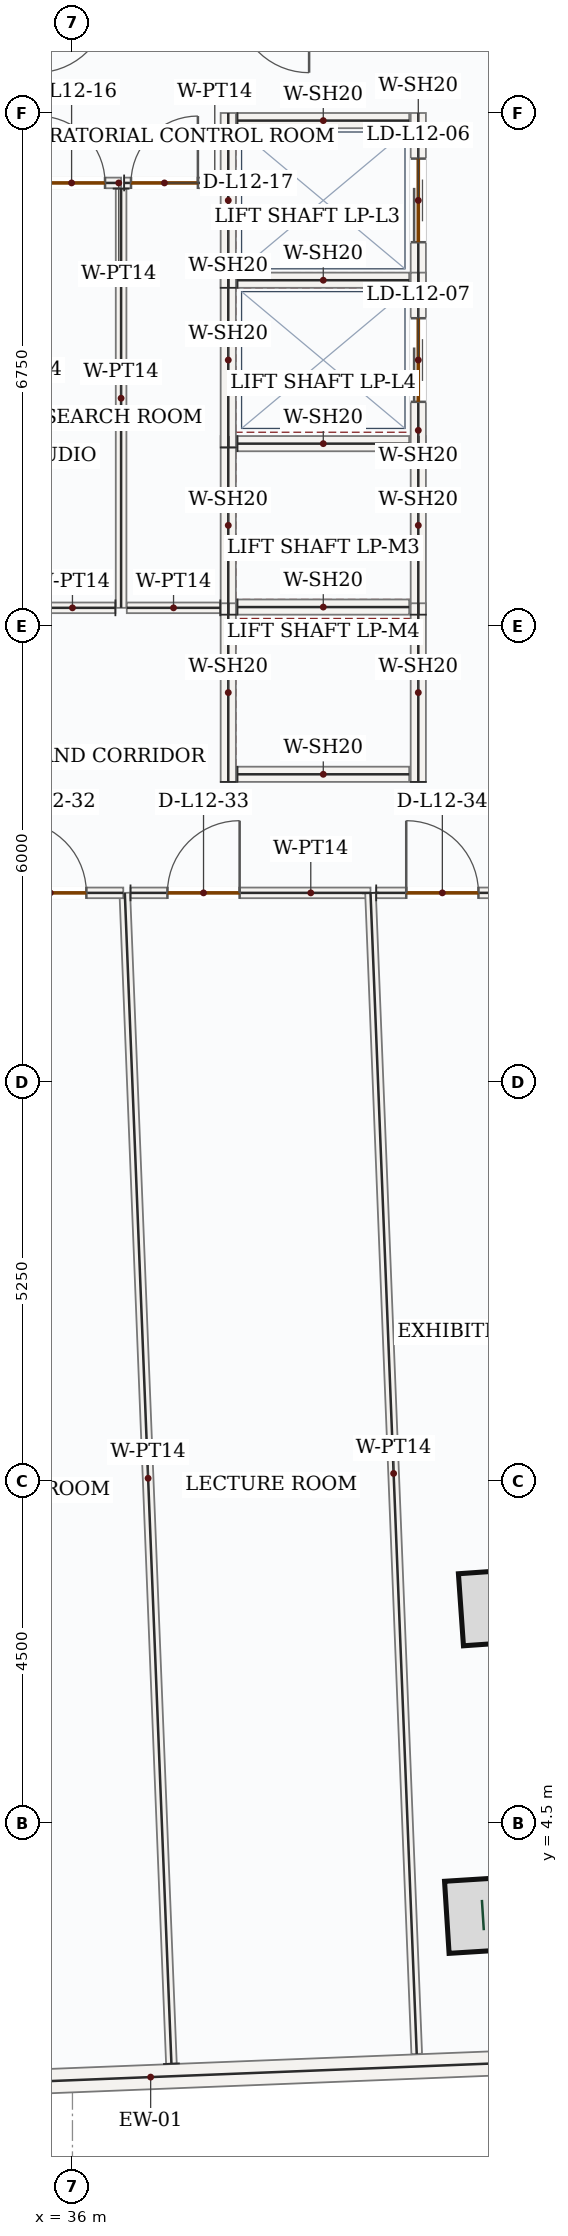
"""IFC4 building model, lengths in metres.
Left out: names, types, materials, properties, quantities, classifications, styles, units other than length and angle.
Written with IfcOpenShell. Run it as: python <this file> out.ifc"""

import sys

from ifc_helpers import new_model, si_unit, direction, frame, frame_2d, origin, origin_2d, place, context, subcontext, project, spatial, rectangle, hollow_rectangle, extrude, source, transform, mapped, element, fill, save


model = new_model("IFC4")
c1 = context("Model", 3, precision=1e-05, world=origin(), true_north=direction((0.0, 1.0)))
c2 = subcontext(c1, "Body", "Model", "MODEL_VIEW")
j1 = project(units=[si_unit("LENGTHUNIT", "METRE"), si_unit("PLANEANGLEUNIT", "RADIAN")], contexts=[c1])
p1 = place(None, origin())
s1 = spatial("IfcSite", under=j1, at=p1, CompositionType="ELEMENT")
p2 = place(p1, origin())
s2 = spatial("IfcBuilding", under=s1, at=p2, CompositionType="ELEMENT")
p3 = place(p2, frame((0.0, 0.0, 58.5)))
s3 = spatial("IfcBuildingStorey", under=s2, at=p3, CompositionType="ELEMENT", Elevation=58.5)
m1 = source(origin(), c2, "Body", "SweptSolid", [
    extrude(hollow_rectangle(XDim=0.95, YDim=0.95, WallThickness=0.05, at=origin_2d()), origin(), (0.0, 0.0, 1.0), 4.2),
])
for number, where, z_axis, x_axis in (
    (1, (41.585, 7.342, 0.0), (0.0, 0.0, 1.0), (-0.07, 0.998, 0.0)),
    (2, (41.399, 3.292, 0.0), (0.0, 0.0, 1.0), (-0.063, 0.998, 0.0)),
):
    element("IfcColumn", number, at=place(p3, frame(where, z_axis=z_axis, x_axis=x_axis)), inside=s3, PredefinedType="COLUMN", context=c2, shape_type="MappedRepresentation", body=[
        mapped(m1, transform((0.0, 0.0, 0.0), x_axis=(1.0, 0.0, 0.0), y_axis=(0.0, 1.0, 0.0), z_axis=(0.0, 0.0, 1.0), scale=1.0)),
    ])
m2 = source(origin(), c2, "Body", "SweptSolid", [
    extrude(rectangle(XDim=9.92, YDim=0.32, at=frame_2d((4.96, 0.0))), origin(), (0.0, 0.0, 1.0), 3.95),
])
p4 = place(p3, frame((41.985, 1.358, 0.0), z_axis=(0.0, 0.0, 1.0), x_axis=(-0.999207823998, -0.039796035749, 0.0)))
e3 = element("IfcWall", 3, at=p4, inside=s3, PredefinedType="SOLIDWALL", context=c2, shape_type="MappedRepresentation", body=[
    mapped(m2, transform((0.0, 0.0, 0.0), x_axis=(1.0, 0.0, 0.0), y_axis=(0.0, 1.0, 0.0), z_axis=(0.0, 0.0, 1.0), scale=1.0)),
])
m3 = source(origin(), c2, "Body", "SweptSolid", [
    extrude(rectangle(XDim=2.35, YDim=0.2, at=frame_2d((1.175, 0.0))), origin(), (0.0, 0.0, 1.0), 3.95),
])
for number, where, z_axis, x_axis in (
    (4, (38.05, 20.4, 0.0), (0.0, 0.0, 1.0), (0.0, 1.0, 0.0)),
    (5, (40.55, 20.4, 0.0), (0.0, 0.0, 1.0), (0.0, 1.0, 0.0)),
):
    element("IfcWall", number, at=place(p3, frame(where, z_axis=z_axis, x_axis=x_axis)), inside=s3, PredefinedType="SOLIDWALL", context=c2, shape_type="MappedRepresentation", body=[
        mapped(m3, transform((0.0, 0.0, 0.0), x_axis=(1.0, 0.0, 0.0), y_axis=(0.0, 1.0, 0.0), z_axis=(0.0, 0.0, 1.0), scale=1.0)),
    ])
m4 = source(origin(), c2, "Body", "SweptSolid", [
    extrude(rectangle(XDim=2.26, YDim=0.2, at=frame_2d((1.13, 0.0))), origin(), (0.0, 0.0, 1.0), 3.95),
])
for number, where, z_axis, x_axis in (
    (6, (38.17, 20.5, 0.0), (0.0, 0.0, 1.0), (1.0, 0.0, 0.0)),
    (7, (38.17, 22.65, 0.0), (0.0, 0.0, 1.0), (1.0, 0.0, 0.0)),
):
    element("IfcWall", number, at=place(p3, frame(where, z_axis=z_axis, x_axis=x_axis)), inside=s3, PredefinedType="SOLIDWALL", context=c2, shape_type="MappedRepresentation", body=[
        mapped(m4, transform((0.0, 0.0, 0.0), x_axis=(1.0, 0.0, 0.0), y_axis=(0.0, 1.0, 0.0), z_axis=(0.0, 0.0, 1.0), scale=1.0)),
    ])
for number, where, z_axis, x_axis in (
    (8, (38.05, 18.2, 0.0), (0.0, 0.0, 1.0), (0.0, 1.0, 0.0)),
    (9, (40.55, 18.2, 0.0), (0.0, 0.0, 1.0), (0.0, 1.0, 0.0)),
):
    element("IfcWall", number, at=place(p3, frame(where, z_axis=z_axis, x_axis=x_axis)), inside=s3, PredefinedType="SOLIDWALL", context=c2, shape_type="MappedRepresentation", body=[
        mapped(m3, transform((0.0, 0.0, 0.0), x_axis=(1.0, 0.0, 0.0), y_axis=(0.0, 1.0, 0.0), z_axis=(0.0, 0.0, 1.0), scale=1.0)),
    ])
p5 = place(p3, frame((38.17, 18.3, 0.0), z_axis=(0.0, 0.0, 1.0), x_axis=(1.0, 0.0, 0.0)))
e10 = element("IfcWall", 10, at=p5, inside=s3, PredefinedType="SOLIDWALL", context=c2, shape_type="MappedRepresentation", body=[
    mapped(m4, transform((0.0, 0.0, 0.0), x_axis=(1.0, 0.0, 0.0), y_axis=(0.0, 1.0, 0.0), z_axis=(0.0, 0.0, 1.0), scale=1.0)),
])
m5 = source(origin(), c2, "Body", "SweptSolid", [
    extrude(rectangle(XDim=2.3, YDim=0.2, at=frame_2d((1.15, 0.0))), origin(), (0.0, 0.0, 1.0), 3.95),
])
p6 = place(p3, frame((38.05, 24.7, 0.0), z_axis=(0.0, 0.0, 1.0), x_axis=(0.0, 1.0, 0.0)))
e11 = element("IfcWall", 11, at=p6, inside=s3, PredefinedType="SOLIDWALL", context=c2, shape_type="MappedRepresentation", body=[
    mapped(m5, transform((0.0, 0.0, 0.0), x_axis=(1.0, 0.0, 0.0), y_axis=(0.0, 1.0, 0.0), z_axis=(0.0, 0.0, 1.0), scale=1.0)),
])
p7 = place(p3, frame((40.55, 24.7, 0.0), z_axis=(0.0, 0.0, 1.0), x_axis=(0.0, 1.0, 0.0)))
e12 = element("IfcWall", 12, at=p7, inside=s3, PredefinedType="SOLIDWALL", context=c2, shape_type="SweptSolid", body=[
    extrude(rectangle(XDim=2.3, YDim=0.2, at=frame_2d((1.15, 0.0))), origin(), (0.0, 0.0, 1.0), 3.95),
])
p8 = place(p7, frame((0.6, 0.0, 0.0)))
e13 = element("IfcOpeningElement", 13, at=p8, cuts=e12, PredefinedType="OPENING", context=c2, shape_type="SweptSolid", body=[
    extrude(rectangle(XDim=1.1, YDim=2.15, at=frame_2d((0.55, 1.075))), frame((0.0, 0.11, 0.0), z_axis=(0.0, -1.0, 0.0), x_axis=(1.0, 0.0, 0.0)), (0.0, 0.0, 1.0), 0.22),
])
for number, where, z_axis, x_axis in (
    (14, (38.17, 24.8, 0.0), (0.0, 0.0, 1.0), (1.0, 0.0, 0.0)),
    (15, (38.17, 26.9, 0.0), (0.0, 0.0, 1.0), (1.0, 0.0, 0.0)),
):
    element("IfcWall", number, at=place(p3, frame(where, z_axis=z_axis, x_axis=x_axis)), inside=s3, PredefinedType="SOLIDWALL", context=c2, shape_type="MappedRepresentation", body=[
        mapped(m4, transform((0.0, 0.0, 0.0), x_axis=(1.0, 0.0, 0.0), y_axis=(0.0, 1.0, 0.0), z_axis=(0.0, 0.0, 1.0), scale=1.0)),
    ])
m6 = source(origin(), c2, "Body", "SweptSolid", [
    extrude(rectangle(XDim=2.3, YDim=0.2, at=frame_2d((1.15, 0.0))), origin(), (0.0, 0.0, 1.0), 3.95),
])
p9 = place(p3, frame((38.05, 22.6, 0.0), z_axis=(0.0, 0.0, 1.0), x_axis=(0.0, 1.0, 0.0)))
e16 = element("IfcWall", 16, at=p9, inside=s3, PredefinedType="SOLIDWALL", context=c2, shape_type="MappedRepresentation", body=[
    mapped(m6, transform((0.0, 0.0, 0.0), x_axis=(1.0, 0.0, 0.0), y_axis=(0.0, 1.0, 0.0), z_axis=(0.0, 0.0, 1.0), scale=1.0)),
])
p10 = place(p3, frame((40.55, 22.6, 0.0), z_axis=(0.0, 0.0, 1.0), x_axis=(0.0, 1.0, 0.0)))
e17 = element("IfcWall", 17, at=p10, inside=s3, PredefinedType="SOLIDWALL", context=c2, shape_type="SweptSolid", body=[
    extrude(rectangle(XDim=2.3, YDim=0.2, at=frame_2d((1.15, 0.0))), origin(), (0.0, 0.0, 1.0), 3.95),
])
p11 = place(p10, frame((0.6, 0.0, 0.0)))
e18 = element("IfcOpeningElement", 18, at=p11, cuts=e17, PredefinedType="OPENING", context=c2, shape_type="SweptSolid", body=[
    extrude(rectangle(XDim=1.1, YDim=2.15, at=frame_2d((0.55, 1.075))), frame((0.0, 0.11, 0.0), z_axis=(0.0, -1.0, 0.0), x_axis=(1.0, 0.0, 0.0)), (0.0, 0.0, 1.0), 0.22),
])
p12 = place(p3, frame((35.435, 26.08, 0.0), z_axis=(0.0, 0.0, 1.0), x_axis=(1.0, 0.0, 0.0)))
e19 = element("IfcWall", 19, at=p12, inside=s3, PredefinedType="PARTITIONING", context=c2, shape_type="SweptSolid", body=[
    extrude(rectangle(XDim=1.205, YDim=0.14, at=frame_2d((0.603, 0.0))), origin(), (0.0, 0.0, 1.0), 3.95),
])
p13 = place(p12, frame((0.114, 0.0, 0.0)))
e20 = element("IfcOpeningElement", 20, at=p13, cuts=e19, PredefinedType="OPENING", context=c2, shape_type="SweptSolid", body=[
    extrude(rectangle(XDim=0.88, YDim=2.1, at=frame_2d((0.44, 1.05))), frame((0.0, 0.08, 0.0), z_axis=(0.0, -1.0, 0.0), x_axis=(1.0, 0.0, 0.0)), (0.0, 0.0, 1.0), 0.16),
])
m7 = source(origin(), c2, "Body", "SweptSolid", [
    extrude(rectangle(XDim=5.515, YDim=0.14, at=frame_2d((2.757, 0.0))), origin(), (0.0, 0.0, 1.0), 3.95),
])
p14 = place(p3, frame((36.64, 26.005, 0.0), z_axis=(0.0, 0.0, 1.0), x_axis=(0.0, -1.0, 0.0)))
e21 = element("IfcWall", 21, at=p14, inside=s3, PredefinedType="PARTITIONING", context=c2, shape_type="MappedRepresentation", body=[
    mapped(m7, transform((0.0, 0.0, 0.0), x_axis=(1.0, 0.0, 0.0), y_axis=(0.0, 1.0, 0.0), z_axis=(0.0, 0.0, 1.0), scale=1.0)),
])
m8 = source(origin(), c2, "Body", "SweptSolid", [
    extrude(rectangle(XDim=1.13, YDim=0.14, at=frame_2d((0.565, 0.0))), origin(), (0.0, 0.0, 1.0), 3.95),
])
p15 = place(p3, frame((36.565, 20.49, 0.0), z_axis=(0.0, 0.0, 1.0), x_axis=(-1.0, 0.0, 0.0)))
e22 = element("IfcWall", 22, at=p15, inside=s3, PredefinedType="PARTITIONING", context=c2, shape_type="MappedRepresentation", body=[
    mapped(m8, transform((0.0, 0.0, 0.0), x_axis=(1.0, 0.0, 0.0), y_axis=(0.0, 1.0, 0.0), z_axis=(0.0, 0.0, 1.0), scale=1.0)),
])
p16 = place(p3, frame((36.68, 26.08, 0.0), z_axis=(0.0, 0.0, 1.0), x_axis=(1.0, 0.0, 0.0)))
e23 = element("IfcWall", 23, at=p16, inside=s3, PredefinedType="PARTITIONING", context=c2, shape_type="SweptSolid", body=[
    extrude(rectangle(XDim=1.265, YDim=0.14, at=frame_2d((0.633, 0.0))), origin(), (0.0, 0.0, 1.0), 3.95),
])
p17 = place(p16, frame((0.09, 0.0, 0.0)))
e24 = element("IfcOpeningElement", 24, at=p17, cuts=e23, PredefinedType="OPENING", context=c2, shape_type="SweptSolid", body=[
    extrude(rectangle(XDim=0.88, YDim=2.1, at=frame_2d((0.44, 1.05))), frame((0.0, 0.08, 0.0), z_axis=(0.0, -1.0, 0.0), x_axis=(1.0, 0.0, 0.0)), (0.0, 0.0, 1.0), 0.16),
])
m9 = source(origin(), c2, "Body", "SweptSolid", [
    extrude(rectangle(XDim=1.23, YDim=0.14, at=frame_2d((0.615, 0.0))), origin(), (0.0, 0.0, 1.0), 3.95),
])
p18 = place(p3, frame((37.945, 20.49, 0.0), z_axis=(0.0, 0.0, 1.0), x_axis=(-1.0, 0.0, 0.0)))
e25 = element("IfcWall", 25, at=p18, inside=s3, PredefinedType="PARTITIONING", context=c2, shape_type="MappedRepresentation", body=[
    mapped(m9, transform((0.0, 0.0, 0.0), x_axis=(1.0, 0.0, 0.0), y_axis=(0.0, 1.0, 0.0), z_axis=(0.0, 0.0, 1.0), scale=1.0)),
])
m10 = source(origin(), c2, "Body", "SweptSolid", [
    extrude(rectangle(XDim=15.416, YDim=0.14, at=frame_2d((7.708, 0.0))), origin(), (0.0, 0.0, 1.0), 3.95),
])
p19 = place(p3, frame((37.302, 1.336, 0.0), z_axis=(0.0, 0.0, 1.0), x_axis=(-0.039782723686, 0.999208354096, 0.0)))
e26 = element("IfcWall", 26, at=p19, inside=s3, PredefinedType="PARTITIONING", context=c2, shape_type="MappedRepresentation", body=[
    mapped(m10, transform((0.0, 0.0, 0.0), x_axis=(1.0, 0.0, 0.0), y_axis=(0.0, 1.0, 0.0), z_axis=(0.0, 0.0, 1.0), scale=1.0)),
])
p20 = place(p3, frame((36.764, 16.74, 0.0), z_axis=(0.0, 0.0, 1.0), x_axis=(1.0, 0.0, 0.0)))
e27 = element("IfcWall", 27, at=p20, inside=s3, PredefinedType="PARTITIONING", context=c2, shape_type="SweptSolid", body=[
    extrude(rectangle(XDim=3.157, YDim=0.14, at=frame_2d((1.579, 0.0))), origin(), (0.0, 0.0, 1.0), 3.95),
])
p21 = place(p20, frame((0.486, 0.0, 0.0)))
e28 = element("IfcOpeningElement", 28, at=p21, cuts=e27, PredefinedType="OPENING", context=c2, shape_type="SweptSolid", body=[
    extrude(rectangle(XDim=0.95, YDim=2.15, at=frame_2d((0.475, 1.075))), frame((0.0, 0.08, 0.0), z_axis=(0.0, -1.0, 0.0), x_axis=(1.0, 0.0, 0.0)), (0.0, 0.0, 1.0), 0.16),
])
m11 = source(origin(), c2, "Body", "SweptSolid", [
    extrude(rectangle(XDim=15.286, YDim=0.14, at=frame_2d((7.643, 0.0))), origin(), (0.0, 0.0, 1.0), 3.95),
])
p22 = place(p3, frame((39.921, 16.739, 0.0), z_axis=(0.0, 0.0, 1.0), x_axis=(0.039769031662, -0.99920889914, 0.0)))
e29 = element("IfcWall", 29, at=p22, inside=s3, PredefinedType="PARTITIONING", context=c2, shape_type="MappedRepresentation", body=[
    mapped(m11, transform((0.0, 0.0, 0.0), x_axis=(1.0, 0.0, 0.0), y_axis=(0.0, 1.0, 0.0), z_axis=(0.0, 0.0, 1.0), scale=1.0)),
])
p23 = place(p3, frame((33.511, 16.74, 0.0), z_axis=(0.0, 0.0, 1.0), x_axis=(1.0, 0.0, 0.0)))
e30 = element("IfcWall", 30, at=p23, inside=s3, PredefinedType="PARTITIONING", context=c2, shape_type="SweptSolid", body=[
    extrude(rectangle(XDim=3.157, YDim=0.14, at=frame_2d((1.579, 0.0))), origin(), (0.0, 0.0, 1.0), 3.95),
])
p24 = place(p23, frame((1.722, 0.0, 0.0)))
e31 = element("IfcOpeningElement", 31, at=p24, cuts=e30, PredefinedType="OPENING", context=c2, shape_type="SweptSolid", body=[
    extrude(rectangle(XDim=0.95, YDim=2.15, at=frame_2d((0.475, 1.075))), frame((0.0, 0.08, 0.0), z_axis=(0.0, -1.0, 0.0), x_axis=(1.0, 0.0, 0.0)), (0.0, 0.0, 1.0), 0.16),
])
p25 = place(p3, frame((39.996, 16.74, 0.0), z_axis=(0.0, 0.0, 1.0), x_axis=(0.999999996048, 8.8904694e-05, 0.0)))
e32 = element("IfcWall", 32, at=p25, inside=s3, PredefinedType="PARTITIONING", context=c2, shape_type="SweptSolid", body=[
    extrude(rectangle(XDim=2.746, YDim=0.14, at=frame_2d((1.373, 0.0))), origin(), (0.0, 0.0, 1.0), 3.95),
])
p26 = place(p25, frame((0.395, 0.0, 0.0)))
e33 = element("IfcOpeningElement", 33, at=p26, cuts=e32, PredefinedType="OPENING", context=c2, shape_type="SweptSolid", body=[
    extrude(rectangle(XDim=0.95, YDim=2.15, at=frame_2d((0.475, 1.075))), frame((0.0, 0.08, 0.0), z_axis=(0.0, -1.0, 0.0), x_axis=(1.0, 0.0, 0.0)), (0.0, 0.0, 1.0), 0.16),
])
m12 = source(origin(), c2, "Body", "SweptSolid", [
    extrude(rectangle(XDim=1.1, YDim=2.15, at=frame_2d((0.55, 1.075))), frame((0.0, 0.025, 0.0), z_axis=(0.0, -1.0, 0.0), x_axis=(1.0, 0.0, 0.0)), (0.0, 0.0, 1.0), 0.05),
])
p27 = place(p8, origin())
e34 = element("IfcDoor", 34, at=p27, inside=s3, OperationType="DOUBLE_DOOR_SLIDING", PredefinedType="DOOR", context=c2, shape_type="MappedRepresentation", body=[
    mapped(m12, transform((0.0, 0.0, 0.0), x_axis=(1.0, 0.0, 0.0), y_axis=(0.0, 1.0, 0.0), z_axis=(0.0, 0.0, 1.0), scale=1.0)),
])
fill(e13, e34)
p28 = place(p11, origin())
e35 = element("IfcDoor", 35, at=p28, inside=s3, OperationType="DOUBLE_DOOR_SLIDING", PredefinedType="DOOR", context=c2, shape_type="MappedRepresentation", body=[
    mapped(m12, transform((0.0, 0.0, 0.0), x_axis=(1.0, 0.0, 0.0), y_axis=(0.0, 1.0, 0.0), z_axis=(0.0, 0.0, 1.0), scale=1.0)),
])
fill(e18, e35)
m13 = source(origin(), c2, "Body", "SweptSolid", [
    extrude(rectangle(XDim=0.88, YDim=2.1, at=frame_2d((0.44, 1.05))), frame((0.0, 0.025, 0.0), z_axis=(0.0, -1.0, 0.0), x_axis=(1.0, 0.0, 0.0)), (0.0, 0.0, 1.0), 0.05),
])
p29 = place(p13, origin())
e36 = element("IfcDoor", 36, at=p29, inside=s3, OperationType="SINGLE_SWING_LEFT", PredefinedType="DOOR", context=c2, shape_type="MappedRepresentation", body=[
    mapped(m13, transform((0.0, 0.0, 0.0), x_axis=(1.0, 0.0, 0.0), y_axis=(0.0, 1.0, 0.0), z_axis=(0.0, 0.0, 1.0), scale=1.0)),
])
fill(e20, e36)
p30 = place(p17, origin())
e37 = element("IfcDoor", 37, at=p30, inside=s3, OperationType="SINGLE_SWING_RIGHT", PredefinedType="DOOR", context=c2, shape_type="MappedRepresentation", body=[
    mapped(m13, transform((0.0, 0.0, 0.0), x_axis=(1.0, 0.0, 0.0), y_axis=(0.0, 1.0, 0.0), z_axis=(0.0, 0.0, 1.0), scale=1.0)),
])
fill(e24, e37)
m14 = source(origin(), c2, "Body", "SweptSolid", [
    extrude(rectangle(XDim=0.95, YDim=2.15, at=frame_2d((0.475, 1.075))), frame((0.0, 0.025, 0.0), z_axis=(0.0, -1.0, 0.0), x_axis=(1.0, 0.0, 0.0)), (0.0, 0.0, 1.0), 0.05),
])
p31 = place(p24, origin())
e38 = element("IfcDoor", 38, at=p31, inside=s3, OperationType="SINGLE_SWING_LEFT", PredefinedType="DOOR", context=c2, shape_type="MappedRepresentation", body=[
    mapped(m14, transform((0.0, 0.0, 0.0), x_axis=(1.0, 0.0, 0.0), y_axis=(0.0, 1.0, 0.0), z_axis=(0.0, 0.0, 1.0), scale=1.0)),
])
fill(e31, e38)
p32 = place(p21, origin())
e39 = element("IfcDoor", 39, at=p32, inside=s3, OperationType="SINGLE_SWING_RIGHT", PredefinedType="DOOR", context=c2, shape_type="MappedRepresentation", body=[
    mapped(m14, transform((0.0, 0.0, 0.0), x_axis=(1.0, 0.0, 0.0), y_axis=(0.0, 1.0, 0.0), z_axis=(0.0, 0.0, 1.0), scale=1.0)),
])
fill(e28, e39)
p33 = place(p26, origin())
e40 = element("IfcDoor", 40, at=p33, inside=s3, OperationType="SINGLE_SWING_LEFT", PredefinedType="DOOR", context=c2, shape_type="MappedRepresentation", body=[
    mapped(m14, transform((0.0, 0.0, 0.0), x_axis=(1.0, 0.0, 0.0), y_axis=(0.0, 1.0, 0.0), z_axis=(0.0, 0.0, 1.0), scale=1.0)),
])
fill(e33, e40)
save(model, sys.argv[1])
